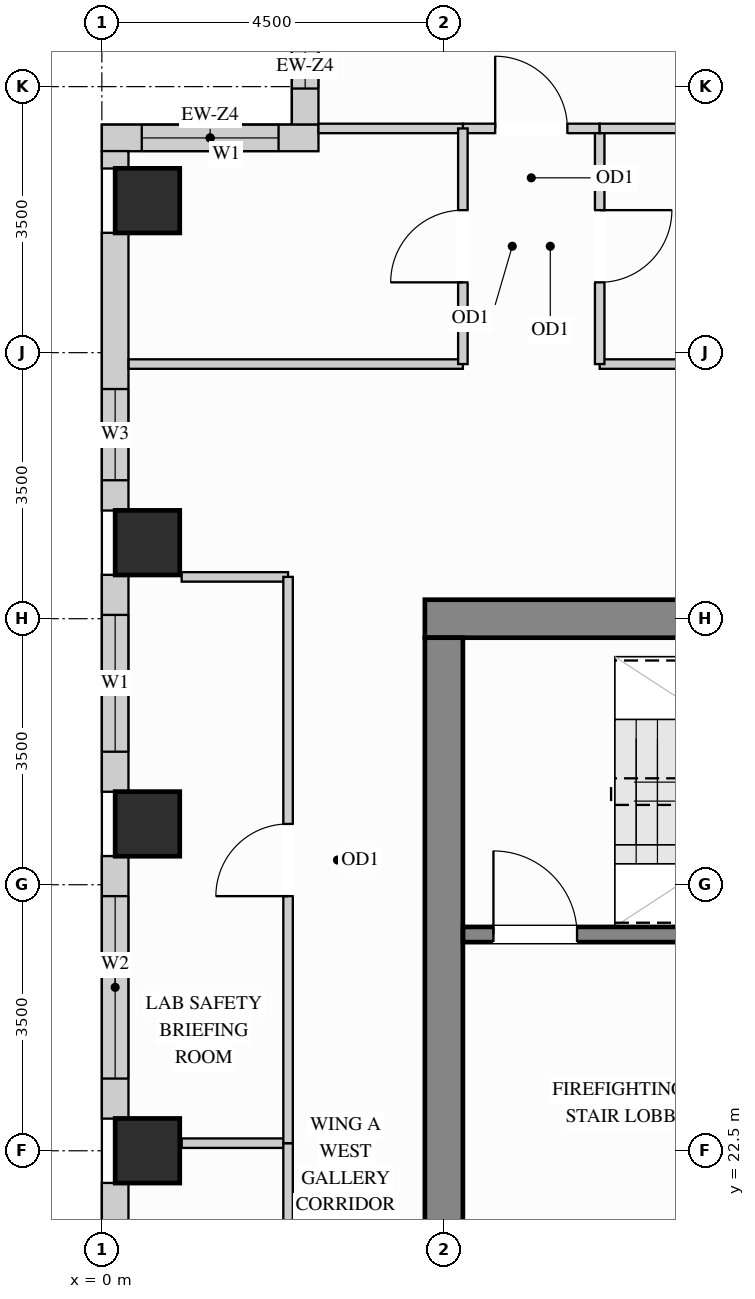
"""IFC4 building model, lengths in metres.
Left out: names, types, materials, properties, quantities, classifications, styles, units other than length and angle.
Written with IfcOpenShell. Run it as: python <this file> out.ifc"""

import sys

from ifc_helpers import new_model, si_unit, direction, frame, frame_2d, origin, origin_2d, place, context, subcontext, project, spatial, rectangle, extrude, source, transform, mapped, element, fill, save


model = new_model("IFC4")
c1 = context("Model", 3, precision=1e-05, world=origin(), true_north=direction((0.0, 1.0)))
c2 = subcontext(c1, "Body", "Model", "MODEL_VIEW")
j1 = project(units=[si_unit("LENGTHUNIT", "METRE"), si_unit("PLANEANGLEUNIT", "RADIAN")], contexts=[c1])
p1 = place(None, origin())
s1 = spatial("IfcSite", under=j1, at=p1, CompositionType="ELEMENT")
p2 = place(p1, origin())
s2 = spatial("IfcBuilding", under=s1, at=p2, CompositionType="ELEMENT")
p3 = place(p2, frame((0.0, 0.0, 230.4)))
s3 = spatial("IfcBuildingStorey", under=s2, at=p3, CompositionType="ELEMENT", Elevation=230.4)
m1 = source(origin(), c2, "Body", "SweptSolid", [
    extrude(rectangle(XDim=0.85, YDim=0.85, at=origin_2d()), origin(), (0.0, 0.0, 1.0), 3.4),
])
for number, where, z_axis, x_axis in (
    (1, (0.6, 22.5, 0.0), (0.0, 0.0, 1.0), (1.0, 0.0, 0.0)),
    (2, (0.6, 26.8, 0.0), (0.0, 0.0, 1.0), (1.0, 0.0, 0.0)),
    (3, (0.6, 30.5, 0.0), (0.0, 0.0, 1.0), (1.0, 0.0, 0.0)),
    (4, (0.6, 35.0, 0.0), (0.0, 0.0, 1.0), (1.0, 0.0, 0.0)),
):
    element("IfcColumn", number, at=place(p3, frame(where, z_axis=z_axis, x_axis=x_axis)), inside=s3, PredefinedType="COLUMN", context=c2, shape_type="MappedRepresentation", body=[
        mapped(m1, transform((0.0, 0.0, 0.0), x_axis=(1.0, 0.0, 0.0), y_axis=(0.0, 1.0, 0.0), z_axis=(0.0, 0.0, 1.0))),
    ])
m2 = source(origin(), c2, "Body", "SweptSolid", [
    extrude(rectangle(XDim=10.5, YDim=0.5, at=frame_2d((5.25, 0.0))), origin(), (0.0, 0.0, 1.0), 3.4),
])
p4 = place(p3, frame((4.25, 29.5, 0.0), z_axis=(0.0, 0.0, 1.0), x_axis=(1.0, 0.0, 0.0)))
e5 = element("IfcWall", 5, at=p4, inside=s3, PredefinedType="SHEAR", context=c2, shape_type="MappedRepresentation", body=[
    mapped(m2, transform((0.0, 0.0, 0.0), x_axis=(1.0, 0.0, 0.0), y_axis=(0.0, 1.0, 0.0), z_axis=(0.0, 0.0, 1.0))),
])
m3 = source(origin(), c2, "Body", "SweptSolid", [
    extrude(rectangle(XDim=20.5, YDim=0.5, at=frame_2d((10.25, 0.0))), origin(), (0.0, 0.0, 1.0), 3.4),
])
p5 = place(p3, frame((4.5, 8.75, 0.0), z_axis=(0.0, 0.0, 1.0), x_axis=(0.0, 1.0, 0.0)))
e6 = element("IfcWall", 6, at=p5, inside=s3, PredefinedType="SHEAR", context=c2, shape_type="MappedRepresentation", body=[
    mapped(m3, transform((0.0, 0.0, 0.0), x_axis=(1.0, 0.0, 0.0), y_axis=(0.0, 1.0, 0.0), z_axis=(0.0, 0.0, 1.0))),
])
p6 = place(p3, frame((2.675, 38.152, 0.0), z_axis=(0.0, 0.0, 1.0), x_axis=(0.0, -1.0, 0.0)))
e7 = element("IfcWall", 7, at=p6, inside=s3, PredefinedType="SOLIDWALL", context=c2, shape_type="SweptSolid", body=[
    extrude(rectangle(XDim=2.154, YDim=0.35, at=frame_2d((1.077, 0.0))), origin(), (0.0, 0.0, 1.0), 3.385),
])
p7 = place(p6, frame((0.477, 0.0, 0.78)))
e8 = element("IfcOpeningElement", 8, at=p7, cuts=e7, PredefinedType="OPENING", context=c2, shape_type="SweptSolid", body=[
    extrude(rectangle(XDim=1.2, YDim=2.1, at=frame_2d((0.6, 1.05))), frame((0.0, 0.185, 0.0), z_axis=(0.0, -1.0, 0.0), x_axis=(1.0, 0.0, 0.0)), (0.0, 0.0, 1.0), 0.37),
])
p8 = place(p3, frame((2.85, 35.825, 0.0), z_axis=(0.0, 0.0, 1.0), x_axis=(-1.0, 0.0, 0.0)))
e9 = element("IfcWall", 9, at=p8, inside=s3, PredefinedType="SOLIDWALL", context=c2, shape_type="SweptSolid", body=[
    extrude(rectangle(XDim=2.85, YDim=0.35, at=frame_2d((1.425, 0.0))), origin(), (0.0, 0.0, 1.0), 3.385),
])
p9 = place(p8, frame((0.525, 0.0, 0.78)))
e10 = element("IfcOpeningElement", 10, at=p9, cuts=e9, PredefinedType="OPENING", context=c2, shape_type="SweptSolid", body=[
    extrude(rectangle(XDim=1.8, YDim=2.1, at=frame_2d((0.9, 1.05))), frame((0.0, 0.185, 0.0), z_axis=(0.0, -1.0, 0.0), x_axis=(1.0, 0.0, 0.0)), (0.0, 0.0, 1.0), 0.37),
])
m4 = source(origin(), c2, "Body", "SweptSolid", [
    extrude(rectangle(XDim=0.229, YDim=0.35, at=frame_2d((0.115, 0.0))), origin(), (0.0, 0.0, 1.0), 3.385),
])
p10 = place(p3, frame((0.175, 35.652, 0.0), z_axis=(0.0, 0.0, 1.0), x_axis=(0.0, -1.0, 0.0)))
e11 = element("IfcWall", 11, at=p10, inside=s3, PredefinedType="SOLIDWALL", context=c2, shape_type="MappedRepresentation", body=[
    mapped(m4, transform((0.0, 0.0, 0.0), x_axis=(1.0, 0.0, 0.0), y_axis=(0.0, 1.0, 0.0), z_axis=(0.0, 0.0, 1.0))),
])
p11 = place(p3, frame((0.175, 34.577, 0.0), z_axis=(0.0, 0.0, 1.0), x_axis=(0.0, -1.0, 0.0)))
e12 = element("IfcWall", 12, at=p11, inside=s3, PredefinedType="SOLIDWALL", context=c2, shape_type="SweptSolid", body=[
    extrude(rectangle(XDim=3.654, YDim=0.35, at=frame_2d((1.827, 0.0))), origin(), (0.0, 0.0, 1.0), 3.385),
])
p12 = place(p11, frame((2.055, 0.0, 0.78)))
e13 = element("IfcOpeningElement", 13, at=p12, cuts=e12, PredefinedType="OPENING", context=c2, shape_type="SweptSolid", body=[
    extrude(rectangle(XDim=1.2, YDim=2.1, at=frame_2d((0.6, 1.05))), frame((0.0, 0.185, 0.0), z_axis=(0.0, -1.0, 0.0), x_axis=(1.0, 0.0, 0.0)), (0.0, 0.0, 1.0), 0.37),
])
p13 = place(p3, frame((0.175, 30.077, 0.0), z_axis=(0.0, 0.0, 1.0), x_axis=(0.0, -1.0, 0.0)))
e14 = element("IfcWall", 14, at=p13, inside=s3, PredefinedType="SOLIDWALL", context=c2, shape_type="SweptSolid", body=[
    extrude(rectangle(XDim=2.854, YDim=0.35, at=frame_2d((1.427, 0.0))), origin(), (0.0, 0.0, 1.0), 3.385),
])
p14 = place(p13, frame((0.527, 0.0, 0.78)))
e15 = element("IfcOpeningElement", 15, at=p14, cuts=e14, PredefinedType="OPENING", context=c2, shape_type="SweptSolid", body=[
    extrude(rectangle(XDim=1.8, YDim=2.1, at=frame_2d((0.9, 1.05))), frame((0.0, 0.185, 0.0), z_axis=(0.0, -1.0, 0.0), x_axis=(1.0, 0.0, 0.0)), (0.0, 0.0, 1.0), 0.37),
])
p15 = place(p3, frame((0.175, 26.377, 0.0), z_axis=(0.0, 0.0, 1.0), x_axis=(0.0, -1.0, 0.0)))
e16 = element("IfcWall", 16, at=p15, inside=s3, PredefinedType="SOLIDWALL", context=c2, shape_type="SweptSolid", body=[
    extrude(rectangle(XDim=3.454, YDim=0.35, at=frame_2d((1.727, 0.0))), origin(), (0.0, 0.0, 1.0), 3.385),
])
p16 = place(p15, frame((0.527, 0.0, 0.78)))
e17 = element("IfcOpeningElement", 17, at=p16, cuts=e16, PredefinedType="OPENING", context=c2, shape_type="SweptSolid", body=[
    extrude(rectangle(XDim=2.4, YDim=2.1, at=frame_2d((1.2, 1.05))), frame((0.0, 0.185, 0.0), z_axis=(0.0, -1.0, 0.0), x_axis=(1.0, 0.0, 0.0)), (0.0, 0.0, 1.0), 0.37),
])
p17 = place(p3, frame((0.175, 22.077, 0.0), z_axis=(0.0, 0.0, 1.0), x_axis=(0.0, -1.0, 0.0)))
e18 = element("IfcWall", 18, at=p17, inside=s3, PredefinedType="SOLIDWALL", context=c2, shape_type="SweptSolid", body=[
    extrude(rectangle(XDim=3.654, YDim=0.35, at=frame_2d((1.827, 0.0))), origin(), (0.0, 0.0, 1.0), 3.385),
])
p18 = place(p17, frame((0.627, 0.0, 0.78)))
e19 = element("IfcOpeningElement", 19, at=p18, cuts=e18, PredefinedType="OPENING", context=c2, shape_type="SweptSolid", body=[
    extrude(rectangle(XDim=2.4, YDim=2.1, at=frame_2d((1.2, 1.05))), frame((0.0, 0.185, 0.0), z_axis=(0.0, -1.0, 0.0), x_axis=(1.0, 0.0, 0.0)), (0.0, 0.0, 1.0), 0.37),
])
m5 = source(origin(), c2, "Body", "SweptSolid", [
    extrude(rectangle(XDim=12.598, YDim=0.125, at=frame_2d((6.299, 0.0))), origin(), (0.0, 0.0, 1.0), 3.385),
])
p19 = place(p3, frame((6.55, 32.85, 0.0), z_axis=(0.0, 0.0, 1.0), x_axis=(1.0, 0.0, 0.0)))
e20 = element("IfcWall", 20, at=p19, inside=s3, PredefinedType="PARTITIONING", context=c2, shape_type="MappedRepresentation", body=[
    mapped(m5, transform((0.0, 0.0, 0.0), x_axis=(1.0, 0.0, 0.0), y_axis=(0.0, 1.0, 0.0), z_axis=(0.0, 0.0, 1.0))),
])
m6 = source(origin(), c2, "Body", "SweptSolid", [
    extrude(rectangle(XDim=4.398, YDim=0.125, at=frame_2d((2.199, 0.0))), origin(), (0.0, 0.0, 1.0), 3.385),
])
p20 = place(p3, frame((0.352, 32.85, 0.0), z_axis=(0.0, 0.0, 1.0), x_axis=(1.0, 0.0, 0.0)))
e21 = element("IfcWall", 21, at=p20, inside=s3, PredefinedType="PARTITIONING", context=c2, shape_type="MappedRepresentation", body=[
    mapped(m6, transform((0.0, 0.0, 0.0), x_axis=(1.0, 0.0, 0.0), y_axis=(0.0, 1.0, 0.0), z_axis=(0.0, 0.0, 1.0))),
])
m7 = source(origin(), c2, "Body", "SweptSolid", [
    extrude(rectangle(XDim=1.4, YDim=0.125, at=frame_2d((0.7, 0.0))), origin(), (0.0, 0.0, 1.0), 3.385),
])
p21 = place(p3, frame((1.05, 30.05, 0.0), z_axis=(0.0, 0.0, 1.0), x_axis=(1.0, 0.0, 0.0)))
e22 = element("IfcWall", 22, at=p21, inside=s3, PredefinedType="PARTITIONING", context=c2, shape_type="MappedRepresentation", body=[
    mapped(m7, transform((0.0, 0.0, 0.0), x_axis=(1.0, 0.0, 0.0), y_axis=(0.0, 1.0, 0.0), z_axis=(0.0, 0.0, 1.0))),
])
p22 = place(p3, frame((6.55, 32.85, 0.0), z_axis=(0.0, 0.0, 1.0), x_axis=(0.0, 1.0, 0.0)))
e23 = element("IfcWall", 23, at=p22, inside=s3, PredefinedType="PARTITIONING", context=c2, shape_type="SweptSolid", body=[
    extrude(rectangle(XDim=3.1, YDim=0.125, at=frame_2d((1.55, 0.0))), origin(), (0.0, 0.0, 1.0), 3.385),
])
p23 = place(p22, frame((1.075, 0.0, 0.0)))
e24 = element("IfcOpeningElement", 24, at=p23, cuts=e23, PredefinedType="OPENING", context=c2, shape_type="SweptSolid", body=[
    extrude(rectangle(XDim=0.95, YDim=2.15, at=frame_2d((0.475, 1.075))), frame((0.0, 0.073, 0.0), z_axis=(0.0, -1.0, 0.0), x_axis=(1.0, 0.0, 0.0)), (0.0, 0.0, 1.0), 0.145),
])
p24 = place(p3, frame((4.75, 35.95, 0.0), z_axis=(0.0, 0.0, 1.0), x_axis=(1.0, 0.0, 0.0)))
e25 = element("IfcWall", 25, at=p24, inside=s3, PredefinedType="PARTITIONING", context=c2, shape_type="SweptSolid", body=[
    extrude(rectangle(XDim=1.8, YDim=0.125, at=frame_2d((0.9, 0.0))), origin(), (0.0, 0.0, 1.0), 3.385),
])
p25 = place(p24, frame((0.425, 0.0, 0.0)))
e26 = element("IfcOpeningElement", 26, at=p25, cuts=e25, PredefinedType="OPENING", context=c2, shape_type="SweptSolid", body=[
    extrude(rectangle(XDim=0.95, YDim=2.15, at=frame_2d((0.475, 1.075))), frame((0.0, 0.073, 0.0), z_axis=(0.0, -1.0, 0.0), x_axis=(1.0, 0.0, 0.0)), (0.0, 0.0, 1.0), 0.145),
])
m8 = source(origin(), c2, "Body", "SweptSolid", [
    extrude(rectangle(XDim=10.1, YDim=0.125, at=frame_2d((5.05, 0.0))), origin(), (0.0, 0.0, 1.0), 3.385),
])
p26 = place(p3, frame((6.55, 35.95, 0.0), z_axis=(0.0, 0.0, 1.0), x_axis=(1.0, 0.0, 0.0)))
e27 = element("IfcWall", 27, at=p26, inside=s3, PredefinedType="PARTITIONING", context=c2, shape_type="MappedRepresentation", body=[
    mapped(m8, transform((0.0, 0.0, 0.0), x_axis=(1.0, 0.0, 0.0), y_axis=(0.0, 1.0, 0.0), z_axis=(0.0, 0.0, 1.0))),
])
m9 = source(origin(), c2, "Body", "SweptSolid", [
    extrude(rectangle(XDim=1.9, YDim=0.125, at=frame_2d((0.95, 0.0))), origin(), (0.0, 0.0, 1.0), 3.385),
])
p27 = place(p3, frame((2.85, 35.95, 0.0), z_axis=(0.0, 0.0, 1.0), x_axis=(1.0, 0.0, 0.0)))
e28 = element("IfcWall", 28, at=p27, inside=s3, PredefinedType="PARTITIONING", context=c2, shape_type="MappedRepresentation", body=[
    mapped(m9, transform((0.0, 0.0, 0.0), x_axis=(1.0, 0.0, 0.0), y_axis=(0.0, 1.0, 0.0), z_axis=(0.0, 0.0, 1.0))),
])
p28 = place(p3, frame((4.75, 32.85, 0.0), z_axis=(0.0, 0.0, 1.0), x_axis=(0.0, 1.0, 0.0)))
e29 = element("IfcWall", 29, at=p28, inside=s3, PredefinedType="PARTITIONING", context=c2, shape_type="SweptSolid", body=[
    extrude(rectangle(XDim=3.1, YDim=0.125, at=frame_2d((1.55, 0.0))), origin(), (0.0, 0.0, 1.0), 3.385),
])
p29 = place(p28, frame((1.075, 0.0, 0.0)))
e30 = element("IfcOpeningElement", 30, at=p29, cuts=e29, PredefinedType="OPENING", context=c2, shape_type="SweptSolid", body=[
    extrude(rectangle(XDim=0.95, YDim=2.15, at=frame_2d((0.475, 1.075))), frame((0.0, 0.073, 0.0), z_axis=(0.0, -1.0, 0.0), x_axis=(1.0, 0.0, 0.0)), (0.0, 0.0, 1.0), 0.145),
])
p30 = place(p3, frame((1.05, 22.6, 0.0), z_axis=(0.0, 0.0, 1.0), x_axis=(1.0, 0.0, 0.0)))
e31 = element("IfcWall", 31, at=p30, inside=s3, PredefinedType="PARTITIONING", context=c2, shape_type="MappedRepresentation", body=[
    mapped(m7, transform((0.0, 0.0, 0.0), x_axis=(1.0, 0.0, 0.0), y_axis=(0.0, 1.0, 0.0), z_axis=(0.0, 0.0, 1.0))),
])
p31 = place(p3, frame((2.45, 15.1, 0.0), z_axis=(0.0, 0.0, 1.0), x_axis=(0.0, 1.0, 0.0)))
e32 = element("IfcWall", 32, at=p31, inside=s3, PredefinedType="PARTITIONING", context=c2, shape_type="SweptSolid", body=[
    extrude(rectangle(XDim=7.5, YDim=0.125, at=frame_2d((3.75, 0.0))), origin(), (0.0, 0.0, 1.0), 3.385),
])
p32 = place(p31, frame((3.275, 0.0, 0.0)))
e33 = element("IfcOpeningElement", 33, at=p32, cuts=e32, PredefinedType="OPENING", context=c2, shape_type="SweptSolid", body=[
    extrude(rectangle(XDim=0.95, YDim=2.15, at=frame_2d((0.475, 1.075))), frame((0.0, 0.073, 0.0), z_axis=(0.0, -1.0, 0.0), x_axis=(1.0, 0.0, 0.0)), (0.0, 0.0, 1.0), 0.145),
])
p33 = place(p3, frame((2.45, 22.6, 0.0), z_axis=(0.0, 0.0, 1.0), x_axis=(0.0, 1.0, 0.0)))
e34 = element("IfcWall", 34, at=p33, inside=s3, PredefinedType="PARTITIONING", context=c2, shape_type="SweptSolid", body=[
    extrude(rectangle(XDim=7.45, YDim=0.125, at=frame_2d((3.725, 0.0))), origin(), (0.0, 0.0, 1.0), 3.385),
])
p34 = place(p33, frame((3.25, 0.0, 0.0)))
e35 = element("IfcOpeningElement", 35, at=p34, cuts=e34, PredefinedType="OPENING", context=c2, shape_type="SweptSolid", body=[
    extrude(rectangle(XDim=0.95, YDim=2.15, at=frame_2d((0.475, 1.075))), frame((0.0, 0.073, 0.0), z_axis=(0.0, -1.0, 0.0), x_axis=(1.0, 0.0, 0.0)), (0.0, 0.0, 1.0), 0.145),
])
p35 = place(p3, frame((4.752, 25.345, 0.0), z_axis=(0.0, 0.0, 1.0), x_axis=(1.0, 0.0, 0.0)))
e36 = element("IfcWall", 36, at=p35, inside=s3, PredefinedType="SHEAR", context=c2, shape_type="SweptSolid", body=[
    extrude(rectangle(XDim=7.653, YDim=0.2, at=frame_2d((3.827, 0.0))), origin(), (0.0, 0.0, 1.0), 3.4),
])
p36 = place(p35, frame((0.4, 0.0, 0.0)))
e37 = element("IfcOpeningElement", 37, at=p36, cuts=e36, PredefinedType="OPENING", context=c2, shape_type="SweptSolid", body=[
    extrude(rectangle(XDim=1.1, YDim=2.15, at=frame_2d((0.55, 1.075))), frame((0.0, 0.11, 0.0), z_axis=(0.0, -1.0, 0.0), x_axis=(1.0, 0.0, 0.0)), (0.0, 0.0, 1.0), 0.22),
])
m10 = source(origin(), c2, "Body", "SweptSolid", [
    extrude(rectangle(XDim=0.95, YDim=2.15, at=frame_2d((0.475, 1.075))), frame((0.0, 0.025, 0.0), z_axis=(0.0, -1.0, 0.0), x_axis=(1.0, 0.0, 0.0)), (0.0, 0.0, 1.0), 0.05),
])
p37 = place(p23, origin())
e38 = element("IfcDoor", 38, at=p37, inside=s3, OperationType="SINGLE_SWING_RIGHT", PredefinedType="DOOR", context=c2, shape_type="MappedRepresentation", body=[
    mapped(m10, transform((0.0, 0.0, 0.0), x_axis=(1.0, 0.0, 0.0), y_axis=(0.0, 1.0, 0.0), z_axis=(0.0, 0.0, 1.0))),
])
fill(e24, e38)
p38 = place(p25, origin())
e39 = element("IfcDoor", 39, at=p38, inside=s3, OperationType="SINGLE_SWING_LEFT", PredefinedType="DOOR", context=c2, shape_type="MappedRepresentation", body=[
    mapped(m10, transform((0.0, 0.0, 0.0), x_axis=(1.0, 0.0, 0.0), y_axis=(0.0, 1.0, 0.0), z_axis=(0.0, 0.0, 1.0))),
])
fill(e26, e39)
p39 = place(p29, origin())
e40 = element("IfcDoor", 40, at=p39, inside=s3, OperationType="SINGLE_SWING_LEFT", PredefinedType="DOOR", context=c2, shape_type="MappedRepresentation", body=[
    mapped(m10, transform((0.0, 0.0, 0.0), x_axis=(1.0, 0.0, 0.0), y_axis=(0.0, 1.0, 0.0), z_axis=(0.0, 0.0, 1.0))),
])
fill(e30, e40)
p40 = place(p34, origin())
e41 = element("IfcDoor", 41, at=p40, inside=s3, OperationType="SINGLE_SWING_LEFT", PredefinedType="DOOR", context=c2, shape_type="MappedRepresentation", body=[
    mapped(m10, transform((0.0, 0.0, 0.0), x_axis=(1.0, 0.0, 0.0), y_axis=(0.0, 1.0, 0.0), z_axis=(0.0, 0.0, 1.0))),
])
fill(e35, e41)
m11 = source(origin(), c2, "Body", "SweptSolid", [
    extrude(rectangle(XDim=1.1, YDim=2.15, at=frame_2d((0.55, 1.075))), frame((0.0, 0.025, 0.0), z_axis=(0.0, -1.0, 0.0), x_axis=(1.0, 0.0, 0.0)), (0.0, 0.0, 1.0), 0.05),
])
p41 = place(p36, origin())
e42 = element("IfcDoor", 42, at=p41, inside=s3, OperationType="SINGLE_SWING_LEFT", PredefinedType="DOOR", context=c2, shape_type="MappedRepresentation", body=[
    mapped(m11, transform((0.0, 0.0, 0.0), x_axis=(1.0, 0.0, 0.0), y_axis=(0.0, 1.0, 0.0), z_axis=(0.0, 0.0, 1.0))),
])
fill(e37, e42)
m12 = source(origin(), c2, "Body", "SweptSolid", [
    extrude(rectangle(XDim=1.8, YDim=2.1, at=frame_2d((0.9, 1.05))), frame((0.0, 0.03, 0.0), z_axis=(0.0, -1.0, 0.0), x_axis=(1.0, 0.0, 0.0)), (0.0, 0.0, 1.0), 0.06),
])
p42 = place(p9, origin())
e43 = element("IfcWindow", 43, at=p42, inside=s3, PartitioningType="SINGLE_PANEL", PredefinedType="WINDOW", context=c2, shape_type="MappedRepresentation", body=[
    mapped(m12, transform((0.0, 0.0, 0.0), x_axis=(1.0, 0.0, 0.0), y_axis=(0.0, 1.0, 0.0), z_axis=(0.0, 0.0, 1.0))),
])
fill(e10, e43)
p43 = place(p14, origin())
e44 = element("IfcWindow", 44, at=p43, inside=s3, PartitioningType="SINGLE_PANEL", PredefinedType="WINDOW", context=c2, shape_type="MappedRepresentation", body=[
    mapped(m12, transform((0.0, 0.0, 0.0), x_axis=(1.0, 0.0, 0.0), y_axis=(0.0, 1.0, 0.0), z_axis=(0.0, 0.0, 1.0))),
])
fill(e15, e44)
m13 = source(origin(), c2, "Body", "SweptSolid", [
    extrude(rectangle(XDim=2.4, YDim=2.1, at=frame_2d((1.2, 1.05))), frame((0.0, 0.03, 0.0), z_axis=(0.0, -1.0, 0.0), x_axis=(1.0, 0.0, 0.0)), (0.0, 0.0, 1.0), 0.06),
])
p44 = place(p16, origin())
e45 = element("IfcWindow", 45, at=p44, inside=s3, PartitioningType="SINGLE_PANEL", PredefinedType="WINDOW", context=c2, shape_type="MappedRepresentation", body=[
    mapped(m13, transform((0.0, 0.0, 0.0), x_axis=(1.0, 0.0, 0.0), y_axis=(0.0, 1.0, 0.0), z_axis=(0.0, 0.0, 1.0))),
])
fill(e17, e45)
m14 = source(origin(), c2, "Body", "SweptSolid", [
    extrude(rectangle(XDim=1.2, YDim=2.1, at=frame_2d((0.6, 1.05))), frame((0.0, 0.03, 0.0), z_axis=(0.0, -1.0, 0.0), x_axis=(1.0, 0.0, 0.0)), (0.0, 0.0, 1.0), 0.06),
])
p45 = place(p7, origin())
e46 = element("IfcWindow", 46, at=p45, inside=s3, PartitioningType="SINGLE_PANEL", PredefinedType="WINDOW", context=c2, shape_type="MappedRepresentation", body=[
    mapped(m14, transform((0.0, 0.0, 0.0), x_axis=(1.0, 0.0, 0.0), y_axis=(0.0, 1.0, 0.0), z_axis=(0.0, 0.0, 1.0))),
])
fill(e8, e46)
p46 = place(p12, origin())
e47 = element("IfcWindow", 47, at=p46, inside=s3, PartitioningType="SINGLE_PANEL", PredefinedType="WINDOW", context=c2, shape_type="MappedRepresentation", body=[
    mapped(m14, transform((0.0, 0.0, 0.0), x_axis=(1.0, 0.0, 0.0), y_axis=(0.0, 1.0, 0.0), z_axis=(0.0, 0.0, 1.0))),
])
fill(e13, e47)
save(model, sys.argv[1])
